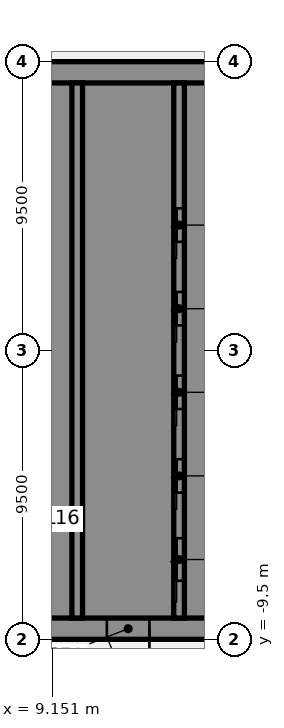
"""IFC4 building model, lengths in metres.
Left out: names, types, materials, properties, quantities, classifications, styles, units other than length and angle.
Written with IfcOpenShell. Run it as: python <this file> out.ifc"""

import sys

from ifc_helpers import new_model, si_unit, direction, frame, frame_2d, origin, place, context, subcontext, project, spatial, polyline, rectangle, outline, extrude, element, fill, save


model = new_model("IFC4")
c1 = context("Model", 3, precision=1e-05, world=origin(), true_north=direction((0.0, 1.0)))
c2 = subcontext(c1, "Body", "Model", "MODEL_VIEW")
j1 = project(units=[si_unit("LENGTHUNIT", "METRE"), si_unit("PLANEANGLEUNIT", "RADIAN")], contexts=[c1])
p1 = place(None, origin())
s1 = spatial("IfcSite", under=j1, at=p1, CompositionType="ELEMENT")
p2 = place(p1, origin())
s2 = spatial("IfcBuilding", under=s1, at=p2, CompositionType="ELEMENT")
p3 = place(p2, frame((0.0, 0.0, 71.5)))
s3 = spatial("IfcBuildingStorey", under=s2, at=p3, CompositionType="ELEMENT", Elevation=71.5)
p4 = place(p3, frame((16.5, -9.15, 0.0), z_axis=(0.0, 0.0, 1.0), x_axis=(-1.0, 0.0, 0.0)))
e1 = element("IfcWall", 1, at=p4, inside=s3, PredefinedType="SHEAR", context=c2, shape_type="SweptSolid", body=[
    extrude(rectangle(XDim=13.0, YDim=0.7, at=frame_2d((6.5, 0.0))), origin(), (0.0, 0.0, 1.0), 3.61),
])
p5 = place(p4, frame((4.15, 0.0, 0.0)))
e2 = element("IfcOpeningElement", 2, at=p5, cuts=e1, PredefinedType="OPENING", context=c2, shape_type="SweptSolid", body=[
    extrude(rectangle(XDim=1.4, YDim=2.1, at=frame_2d((0.7, 1.05))), frame((0.0, 0.36, 0.0), z_axis=(0.0, -1.0, 0.0), x_axis=(1.0, 0.0, 0.0)), (0.0, 0.0, 1.0), 0.72),
])
p6 = place(p4, frame((10.125, 0.0, 0.0)))
e3 = element("IfcOpeningElement", 3, at=p6, cuts=e1, PredefinedType="OPENING", context=c2, shape_type="SweptSolid", body=[
    extrude(rectangle(XDim=1.4, YDim=2.1, at=frame_2d((0.7, 1.05))), frame((0.0, 0.36, 0.0), z_axis=(0.0, -1.0, 0.0), x_axis=(1.0, 0.0, 0.0)), (0.0, 0.0, 1.0), 0.72),
])
p7 = place(p3, origin())
e4 = element("IfcWall", 4, at=p7, inside=s3, PredefinedType="SHEAR", context=c2, shape_type="SweptSolid", body=[
    extrude(outline(polyline([(13.5, -8.8), (15.8, -8.8), (16.5, -8.8), (16.5, 8.8), (15.8, 8.8), (13.5, 8.8), (13.5, 8.125), (15.8, 8.125), (15.8, 5.625), (13.5, 5.625), (13.5, 5.375), (15.8, 5.375), (15.8, 2.875), (13.5, 2.875), (13.5, 2.625), (15.8, 2.625), (15.8, 0.125), (13.5, 0.125), (13.5, -0.125), (15.8, -0.125), (15.8, -2.625), (13.5, -2.625), (13.5, -2.875), (15.8, -2.875), (15.8, -5.375), (13.5, -5.375), (13.5, -5.625), (15.8, -5.625), (15.8, -8.125), (13.5, -8.125), (13.5, -8.8)])), origin(), (0.0, 0.0, 1.0), 3.61),
])
p8 = place(p3, frame((16.5, 9.15, 0.0), z_axis=(0.0, 0.0, 1.0), x_axis=(-1.0, 0.0, 0.0)))
e5 = element("IfcWall", 5, at=p8, inside=s3, PredefinedType="SHEAR", context=c2, shape_type="SweptSolid", body=[
    extrude(rectangle(XDim=13.0, YDim=0.7, at=frame_2d((6.5, 0.0))), origin(), (0.0, 0.0, 1.0), 3.61),
])
p9 = place(p3, origin())
e6 = element("IfcWall", 6, at=p9, inside=s3, PredefinedType="SHEAR", context=c2, shape_type="SweptSolid", body=[
    extrude(outline(polyline([(9.8, -5.375), (7.5, -5.375), (7.5, -2.875), (9.8, -2.875), (9.8, -2.625), (7.5, -2.625), (7.5, -0.125), (9.8, -0.125), (9.8, 0.125), (7.5, 0.125), (7.5, 2.625), (9.8, 2.625), (9.8, 2.875), (7.5, 2.875), (7.5, 5.375), (9.8, 5.375), (9.8, 5.625), (7.5, 5.625), (7.5, 8.125), (9.8, 8.125), (9.8, 8.8), (7.5, 8.8), (7.15, 8.8), (7.15, -5.625), (7.5, -5.625), (9.8, -5.625), (9.8, -5.375)])), origin(), (0.0, 0.0, 1.0), 3.61),
])
p10 = place(p3, origin())
e7 = element("IfcWall", 7, at=p10, inside=s3, PredefinedType="SHEAR", context=c2, shape_type="SweptSolid", body=[
    extrude(outline(polyline([(7.5, -8.125), (7.5, -8.8), (9.8, -8.8), (9.8, -8.125), (9.8, -5.625), (9.55, -5.625), (9.55, -8.125), (7.5, -8.125)])), origin(), (0.0, 0.0, 1.0), 3.61),
])
p11 = place(p3, frame((13.325, -8.8, 0.0), z_axis=(0.0, 0.0, 1.0), x_axis=(0.0, 1.0, 0.0)))
e8 = element("IfcWall", 8, at=p11, inside=s3, PredefinedType="SHEAR", context=c2, shape_type="SweptSolid", body=[
    extrude(rectangle(XDim=17.6, YDim=0.35, at=frame_2d((8.8, 0.0))), origin(), (0.0, 0.0, 1.0), 3.61),
])
p12 = place(p11, frame((1.225, 0.0, 0.0)))
e9 = element("IfcOpeningElement", 9, at=p12, cuts=e8, PredefinedType="OPENING", context=c2, shape_type="SweptSolid", body=[
    extrude(rectangle(XDim=1.4, YDim=2.1, at=frame_2d((0.7, 1.05))), frame((0.0, 0.185, 0.0), z_axis=(0.0, -1.0, 0.0), x_axis=(1.0, 0.0, 0.0)), (0.0, 0.0, 1.0), 0.37),
])
p13 = place(p11, frame((4.125, 0.0, 0.0)))
e10 = element("IfcOpeningElement", 10, at=p13, cuts=e8, PredefinedType="OPENING", context=c2, shape_type="SweptSolid", body=[
    extrude(rectangle(XDim=1.1, YDim=2.1, at=frame_2d((0.55, 1.05))), frame((0.0, 0.185, 0.0), z_axis=(0.0, -1.0, 0.0), x_axis=(1.0, 0.0, 0.0)), (0.0, 0.0, 1.0), 0.37),
])
p14 = place(p11, frame((6.875, 0.0, 0.0)))
e11 = element("IfcOpeningElement", 11, at=p14, cuts=e8, PredefinedType="OPENING", context=c2, shape_type="SweptSolid", body=[
    extrude(rectangle(XDim=1.1, YDim=2.1, at=frame_2d((0.55, 1.05))), frame((0.0, 0.185, 0.0), z_axis=(0.0, -1.0, 0.0), x_axis=(1.0, 0.0, 0.0)), (0.0, 0.0, 1.0), 0.37),
])
p15 = place(p11, frame((9.625, 0.0, 0.0)))
e12 = element("IfcOpeningElement", 12, at=p15, cuts=e8, PredefinedType="OPENING", context=c2, shape_type="SweptSolid", body=[
    extrude(rectangle(XDim=1.1, YDim=2.1, at=frame_2d((0.55, 1.05))), frame((0.0, 0.185, 0.0), z_axis=(0.0, -1.0, 0.0), x_axis=(1.0, 0.0, 0.0)), (0.0, 0.0, 1.0), 0.37),
])
p16 = place(p11, frame((12.375, 0.0, 0.0)))
e13 = element("IfcOpeningElement", 13, at=p16, cuts=e8, PredefinedType="OPENING", context=c2, shape_type="SweptSolid", body=[
    extrude(rectangle(XDim=1.1, YDim=2.1, at=frame_2d((0.55, 1.05))), frame((0.0, 0.185, 0.0), z_axis=(0.0, -1.0, 0.0), x_axis=(1.0, 0.0, 0.0)), (0.0, 0.0, 1.0), 0.37),
])
p17 = place(p3, frame((9.975, -8.8, 0.0), z_axis=(0.0, 0.0, 1.0), x_axis=(0.0, 1.0, 0.0)))
e14 = element("IfcWall", 14, at=p17, inside=s3, PredefinedType="SHEAR", context=c2, shape_type="SweptSolid", body=[
    extrude(rectangle(XDim=17.6, YDim=0.35, at=frame_2d((8.8, 0.0))), origin(), (0.0, 0.0, 1.0), 3.61),
])
p18 = place(p5, origin())
e15 = element("IfcDoor", 15, at=p18, inside=s3, OperationType="SINGLE_SWING_LEFT", PredefinedType="DOOR", context=c2, shape_type="SweptSolid", body=[
    extrude(rectangle(XDim=1.4, YDim=2.1, at=frame_2d((0.7, 1.05))), frame((0.0, 0.025, 0.0), z_axis=(0.0, -1.0, 0.0), x_axis=(1.0, 0.0, 0.0)), (0.0, 0.0, 1.0), 0.05),
])
fill(e2, e15)
p19 = place(p12, origin())
e16 = element("IfcDoor", 16, at=p19, inside=s3, OperationType="SLIDING_TO_LEFT", PredefinedType="DOOR", context=c2, shape_type="SweptSolid", body=[
    extrude(rectangle(XDim=1.4, YDim=2.1, at=frame_2d((0.7, 1.05))), frame((0.0, 0.025, 0.0), z_axis=(0.0, -1.0, 0.0), x_axis=(1.0, 0.0, 0.0)), (0.0, 0.0, 1.0), 0.05),
])
fill(e9, e16)
p20 = place(p13, origin())
e17 = element("IfcDoor", 17, at=p20, inside=s3, OperationType="SLIDING_TO_LEFT", PredefinedType="DOOR", context=c2, shape_type="SweptSolid", body=[
    extrude(rectangle(XDim=1.1, YDim=2.1, at=frame_2d((0.55, 1.05))), frame((0.0, 0.025, 0.0), z_axis=(0.0, -1.0, 0.0), x_axis=(1.0, 0.0, 0.0)), (0.0, 0.0, 1.0), 0.05),
])
fill(e10, e17)
p21 = place(p14, origin())
e18 = element("IfcDoor", 18, at=p21, inside=s3, OperationType="SLIDING_TO_LEFT", PredefinedType="DOOR", context=c2, shape_type="SweptSolid", body=[
    extrude(rectangle(XDim=1.1, YDim=2.1, at=frame_2d((0.55, 1.05))), frame((0.0, 0.025, 0.0), z_axis=(0.0, -1.0, 0.0), x_axis=(1.0, 0.0, 0.0)), (0.0, 0.0, 1.0), 0.05),
])
fill(e11, e18)
p22 = place(p15, origin())
e19 = element("IfcDoor", 19, at=p22, inside=s3, OperationType="SLIDING_TO_LEFT", PredefinedType="DOOR", context=c2, shape_type="SweptSolid", body=[
    extrude(rectangle(XDim=1.1, YDim=2.1, at=frame_2d((0.55, 1.05))), frame((0.0, 0.025, 0.0), z_axis=(0.0, -1.0, 0.0), x_axis=(1.0, 0.0, 0.0)), (0.0, 0.0, 1.0), 0.05),
])
fill(e12, e19)
p23 = place(p16, origin())
e20 = element("IfcDoor", 20, at=p23, inside=s3, OperationType="SLIDING_TO_LEFT", PredefinedType="DOOR", context=c2, shape_type="SweptSolid", body=[
    extrude(rectangle(XDim=1.1, YDim=2.1, at=frame_2d((0.55, 1.05))), frame((0.0, 0.025, 0.0), z_axis=(0.0, -1.0, 0.0), x_axis=(1.0, 0.0, 0.0)), (0.0, 0.0, 1.0), 0.05),
])
fill(e13, e20)
save(model, sys.argv[1])
